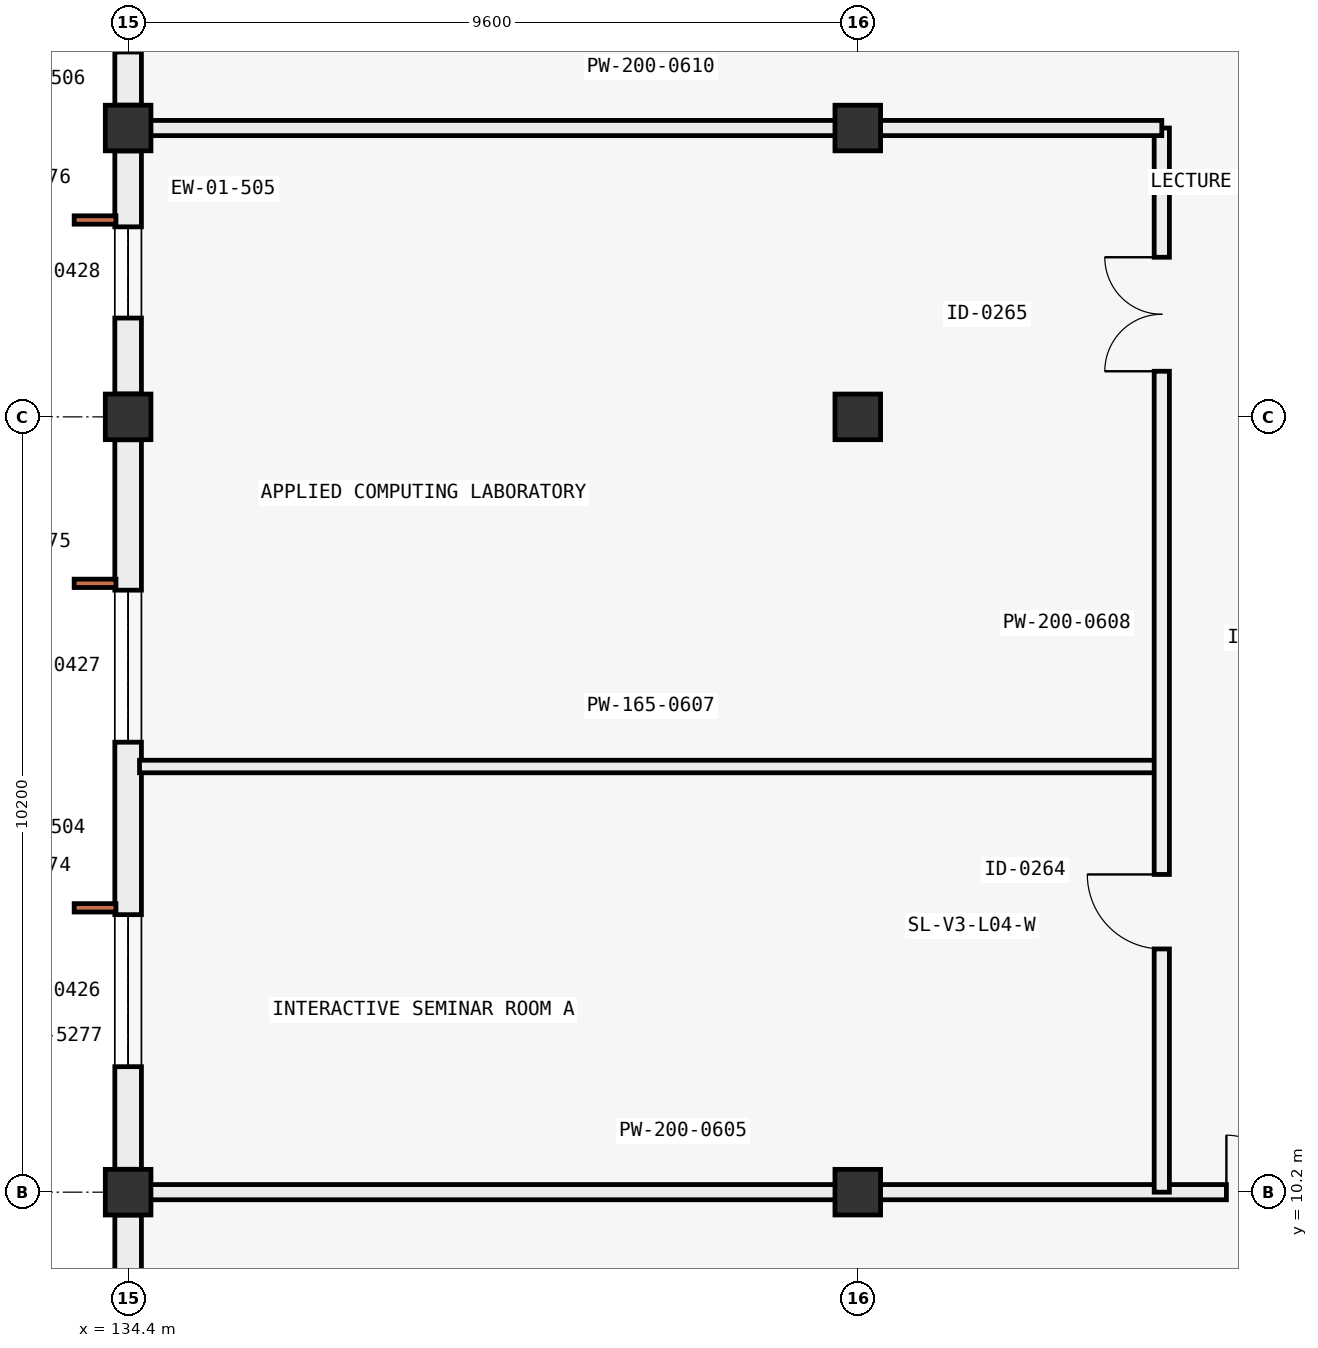
"""IFC4 building model, lengths in metres.
Left out: names, types, materials, properties, quantities, classifications, styles, units other than length and angle.
Written with IfcOpenShell. Run it as: python <this file> out.ifc"""

import sys

from ifc_helpers import new_model, si_unit, direction, frame, frame_2d, origin, origin_2d, place, context, subcontext, project, spatial, rectangle, extrude, element, fill, save


model = new_model("IFC4")
c1 = context("Model", 3, precision=1e-05, world=origin(), true_north=direction((0.0, 1.0)))
c2 = subcontext(c1, "Body", "Model", "MODEL_VIEW")
j1 = project(units=[si_unit("LENGTHUNIT", "METRE"), si_unit("PLANEANGLEUNIT", "RADIAN")], contexts=[c1])
p1 = place(None, origin())
s1 = spatial("IfcSite", under=j1, at=p1, CompositionType="ELEMENT")
p2 = place(p1, origin())
s2 = spatial("IfcBuilding", under=s1, at=p2, CompositionType="ELEMENT")
p3 = place(p2, frame((0.0, 0.0, 18.0)))
s3 = spatial("IfcBuildingStorey", under=s2, at=p3, CompositionType="ELEMENT", Elevation=18.0)
for number, where, z_axis, x_axis in (
    (1, (134.4, 10.2, 0.0), (0.0, 0.0, 1.0), (1.0, 0.0, 0.0)),
    (2, (134.4, 20.4, 0.0), (0.0, 0.0, 1.0), (1.0, 0.0, 0.0)),
    (3, (134.4, 24.2, 0.0), (0.0, 0.0, 1.0), (1.0, 0.0, 0.0)),
    (4, (144.0, 10.2, 0.0), (0.0, 0.0, 1.0), (1.0, 0.0, 0.0)),
    (5, (144.0, 20.4, 0.0), (0.0, 0.0, 1.0), (1.0, 0.0, 0.0)),
    (6, (144.0, 24.2, 0.0), (0.0, 0.0, 1.0), (1.0, 0.0, 0.0)),
):
    element("IfcColumn", number, at=place(p3, frame(where, z_axis=z_axis, x_axis=x_axis)), inside=s3, PredefinedType="COLUMN", context=c2, shape_type="SweptSolid", body=[
        extrude(rectangle(XDim=0.6, YDim=0.6, at=origin_2d()), origin(), (0.0, 0.0, 1.0), 4.2),
    ])
p4 = place(p3, frame((134.4, 0.301, 0.0), z_axis=(0.0, 0.0, 1.0), x_axis=(0.0, 1.0, 0.0)))
e7 = element("IfcWall", 7, at=p4, inside=s3, PredefinedType="SOLIDWALL", context=c2, shape_type="SweptSolid", body=[
    extrude(rectangle(XDim=9.598, YDim=0.35, at=frame_2d((4.799, 0.0))), origin(), (0.0, 0.0, 1.0), 3.3),
])
p5 = place(p4, frame((1.35, 0.0, 0.85)))
e8 = element("IfcOpeningElement", 8, at=p5, cuts=e7, PredefinedType="OPENING", context=c2, shape_type="SweptSolid", body=[
    extrude(rectangle(XDim=2.0, YDim=1.35, at=frame_2d((1.0, 0.675))), frame((0.0, 0.185, 0.0), z_axis=(0.0, -1.0, 0.0), x_axis=(1.0, 0.0, 0.0)), (0.0, 0.0, 1.0), 0.37),
])
p6 = place(p4, frame((5.25, 0.0, 0.85)))
e9 = element("IfcOpeningElement", 9, at=p6, cuts=e7, PredefinedType="OPENING", context=c2, shape_type="SweptSolid", body=[
    extrude(rectangle(XDim=2.0, YDim=1.35, at=frame_2d((1.0, 0.675))), frame((0.0, 0.185, 0.0), z_axis=(0.0, -1.0, 0.0), x_axis=(1.0, 0.0, 0.0)), (0.0, 0.0, 1.0), 0.37),
])
p7 = place(p3, frame((134.4, 10.501, 0.0), z_axis=(0.0, 0.0, 1.0), x_axis=(0.0, 1.0, 0.0)))
e10 = element("IfcWall", 10, at=p7, inside=s3, PredefinedType="SOLIDWALL", context=c2, shape_type="SweptSolid", body=[
    extrude(rectangle(XDim=9.598, YDim=0.35, at=frame_2d((4.799, 0.0))), origin(), (0.0, 0.0, 1.0), 3.3),
])
p8 = place(p7, frame((1.35, 0.0, 0.85)))
e11 = element("IfcOpeningElement", 11, at=p8, cuts=e10, PredefinedType="OPENING", context=c2, shape_type="SweptSolid", body=[
    extrude(rectangle(XDim=2.0, YDim=1.35, at=frame_2d((1.0, 0.675))), frame((0.0, 0.185, 0.0), z_axis=(0.0, -1.0, 0.0), x_axis=(1.0, 0.0, 0.0)), (0.0, 0.0, 1.0), 0.37),
])
p9 = place(p7, frame((5.619, 0.0, 0.85)))
e12 = element("IfcOpeningElement", 12, at=p9, cuts=e10, PredefinedType="OPENING", context=c2, shape_type="SweptSolid", body=[
    extrude(rectangle(XDim=2.0, YDim=1.35, at=frame_2d((1.0, 0.675))), frame((0.0, 0.185, 0.0), z_axis=(0.0, -1.0, 0.0), x_axis=(1.0, 0.0, 0.0)), (0.0, 0.0, 1.0), 0.37),
])
p10 = place(p3, frame((134.4, 20.701, 0.0), z_axis=(0.0, 0.0, 1.0), x_axis=(0.0, 1.0, 0.0)))
e13 = element("IfcWall", 13, at=p10, inside=s3, PredefinedType="SOLIDWALL", context=c2, shape_type="SweptSolid", body=[
    extrude(rectangle(XDim=3.198, YDim=0.35, at=frame_2d((1.599, 0.0))), origin(), (0.0, 0.0, 1.0), 3.3),
])
p11 = place(p10, frame((0.999, 0.0, 0.9)))
e14 = element("IfcOpeningElement", 14, at=p11, cuts=e13, PredefinedType="OPENING", context=c2, shape_type="SweptSolid", body=[
    extrude(rectangle(XDim=1.2, YDim=1.8, at=frame_2d((0.6, 0.9))), frame((0.0, 0.185, 0.0), z_axis=(0.0, -1.0, 0.0), x_axis=(1.0, 0.0, 0.0)), (0.0, 0.0, 1.0), 0.37),
])
p12 = place(p3, frame((134.4, 24.501, 0.0), z_axis=(0.0, 0.0, 1.0), x_axis=(0.0, 1.0, 0.0)))
e15 = element("IfcWall", 15, at=p12, inside=s3, PredefinedType="SOLIDWALL", context=c2, shape_type="SweptSolid", body=[
    extrude(rectangle(XDim=2.598, YDim=0.35, at=frame_2d((1.299, 0.0))), origin(), (0.0, 0.0, 1.0), 3.3),
])
p13 = place(p12, frame((0.699, 0.0, 0.75)))
e16 = element("IfcOpeningElement", 16, at=p13, cuts=e15, PredefinedType="OPENING", context=c2, shape_type="SweptSolid", body=[
    extrude(rectangle(XDim=1.2, YDim=2.4, at=frame_2d((0.6, 1.2))), frame((0.0, 0.185, 0.0), z_axis=(0.0, -1.0, 0.0), x_axis=(1.0, 0.0, 0.0)), (0.0, 0.0, 1.0), 0.37),
])
p14 = place(p3, frame((134.55, 10.2, 0.0), z_axis=(0.0, 0.0, 1.0), x_axis=(1.0, 0.0, 0.0)))
e17 = element("IfcWall", 17, at=p14, inside=s3, PredefinedType="PARTITIONING", context=c2, shape_type="SweptSolid", body=[
    extrude(rectangle(XDim=19.05, YDim=0.2, at=frame_2d((9.525, 0.0))), origin(), (0.0, 0.0, 1.0), 3.85),
])
p15 = place(p14, frame((14.3, 0.0, 0.0)))
e18 = element("IfcOpeningElement", 18, at=p15, cuts=e17, PredefinedType="OPENING", context=c2, shape_type="SweptSolid", body=[
    extrude(rectangle(XDim=1.5, YDim=2.2, at=frame_2d((0.75, 1.1))), frame((0.0, 0.11, 0.0), z_axis=(0.0, -1.0, 0.0), x_axis=(1.0, 0.0, 0.0)), (0.0, 0.0, 1.0), 0.22),
])
p16 = place(p3, frame((134.55, 15.8, 0.0), z_axis=(0.0, 0.0, 1.0), x_axis=(1.0, 0.0, 0.0)))
e19 = element("IfcWall", 19, at=p16, inside=s3, PredefinedType="PARTITIONING", context=c2, shape_type="SweptSolid", body=[
    extrude(rectangle(XDim=13.45, YDim=0.165, at=frame_2d((6.725, 0.0))), origin(), (0.0, 0.0, 1.0), 3.85),
])
p17 = place(p3, frame((148.0, 10.2, 0.0), z_axis=(0.0, 0.0, 1.0), x_axis=(0.0, 1.0, 0.0)))
e20 = element("IfcWall", 20, at=p17, inside=s3, PredefinedType="PARTITIONING", context=c2, shape_type="SweptSolid", body=[
    extrude(rectangle(XDim=14.0, YDim=0.2, at=frame_2d((7.0, 0.0))), origin(), (0.0, 0.0, 1.0), 3.641),
])
p18 = place(p17, frame((3.2, 0.0, 0.0)))
e21 = element("IfcOpeningElement", 21, at=p18, cuts=e20, PredefinedType="OPENING", context=c2, shape_type="SweptSolid", body=[
    extrude(rectangle(XDim=0.98, YDim=2.15, at=frame_2d((0.49, 1.075))), frame((0.0, 0.11, 0.0), z_axis=(0.0, -1.0, 0.0), x_axis=(1.0, 0.0, 0.0)), (0.0, 0.0, 1.0), 0.22),
])
p19 = place(p17, frame((10.8, 0.0, 0.0)))
e22 = element("IfcOpeningElement", 22, at=p19, cuts=e20, PredefinedType="OPENING", context=c2, shape_type="SweptSolid", body=[
    extrude(rectangle(XDim=1.5, YDim=2.2, at=frame_2d((0.75, 1.1))), frame((0.0, 0.11, 0.0), z_axis=(0.0, -1.0, 0.0), x_axis=(1.0, 0.0, 0.0)), (0.0, 0.0, 1.0), 0.22),
])
p20 = place(p3, frame((134.55, 24.2, 0.0), z_axis=(0.0, 0.0, 1.0), x_axis=(1.0, 0.0, 0.0)))
e23 = element("IfcWall", 23, at=p20, inside=s3, PredefinedType="PARTITIONING", context=c2, shape_type="SweptSolid", body=[
    extrude(rectangle(XDim=13.45, YDim=0.2, at=frame_2d((6.725, 0.0))), origin(), (0.0, 0.0, 1.0), 3.641),
])
p21 = place(p8, origin())
e24 = element("IfcWindow", 24, at=p21, inside=s3, PartitioningType="SINGLE_PANEL", PredefinedType="WINDOW", context=c2, shape_type="SweptSolid", body=[
    extrude(rectangle(XDim=2.0, YDim=1.35, at=frame_2d((1.0, 0.675))), frame((0.0, 0.03, 0.0), z_axis=(0.0, -1.0, 0.0), x_axis=(1.0, 0.0, 0.0)), (0.0, 0.0, 1.0), 0.06),
])
fill(e11, e24)
p22 = place(p9, origin())
e25 = element("IfcWindow", 25, at=p22, inside=s3, PartitioningType="SINGLE_PANEL", PredefinedType="WINDOW", context=c2, shape_type="SweptSolid", body=[
    extrude(rectangle(XDim=2.0, YDim=1.35, at=frame_2d((1.0, 0.675))), frame((0.0, 0.03, 0.0), z_axis=(0.0, -1.0, 0.0), x_axis=(1.0, 0.0, 0.0)), (0.0, 0.0, 1.0), 0.06),
])
fill(e12, e25)
p23 = place(p11, origin())
e26 = element("IfcWindow", 26, at=p23, inside=s3, PartitioningType="SINGLE_PANEL", PredefinedType="WINDOW", context=c2, shape_type="SweptSolid", body=[
    extrude(rectangle(XDim=1.2, YDim=1.8, at=frame_2d((0.6, 0.9))), frame((0.0, 0.03, 0.0), z_axis=(0.0, -1.0, 0.0), x_axis=(1.0, 0.0, 0.0)), (0.0, 0.0, 1.0), 0.06),
])
fill(e14, e26)
p24 = place(p15, origin())
e27 = element("IfcDoor", 27, at=p24, inside=s3, OperationType="DOUBLE_DOOR_SINGLE_SWING", PredefinedType="DOOR", context=c2, shape_type="SweptSolid", body=[
    extrude(rectangle(XDim=1.5, YDim=2.2, at=frame_2d((0.75, 1.1))), frame((0.0, 0.025, 0.0), z_axis=(0.0, -1.0, 0.0), x_axis=(1.0, 0.0, 0.0)), (0.0, 0.0, 1.0), 0.05),
])
fill(e18, e27)
p25 = place(p18, origin())
e28 = element("IfcDoor", 28, at=p25, inside=s3, OperationType="SINGLE_SWING_RIGHT", PredefinedType="DOOR", context=c2, shape_type="SweptSolid", body=[
    extrude(rectangle(XDim=0.98, YDim=2.15, at=frame_2d((0.49, 1.075))), frame((0.0, 0.025, 0.0), z_axis=(0.0, -1.0, 0.0), x_axis=(1.0, 0.0, 0.0)), (0.0, 0.0, 1.0), 0.05),
])
fill(e21, e28)
p26 = place(p19, origin())
e29 = element("IfcDoor", 29, at=p26, inside=s3, OperationType="DOUBLE_DOOR_SINGLE_SWING", PredefinedType="DOOR", context=c2, shape_type="SweptSolid", body=[
    extrude(rectangle(XDim=1.5, YDim=2.2, at=frame_2d((0.75, 1.1))), frame((0.0, 0.025, 0.0), z_axis=(0.0, -1.0, 0.0), x_axis=(1.0, 0.0, 0.0)), (0.0, 0.0, 1.0), 0.05),
])
fill(e22, e29)
save(model, sys.argv[1])
